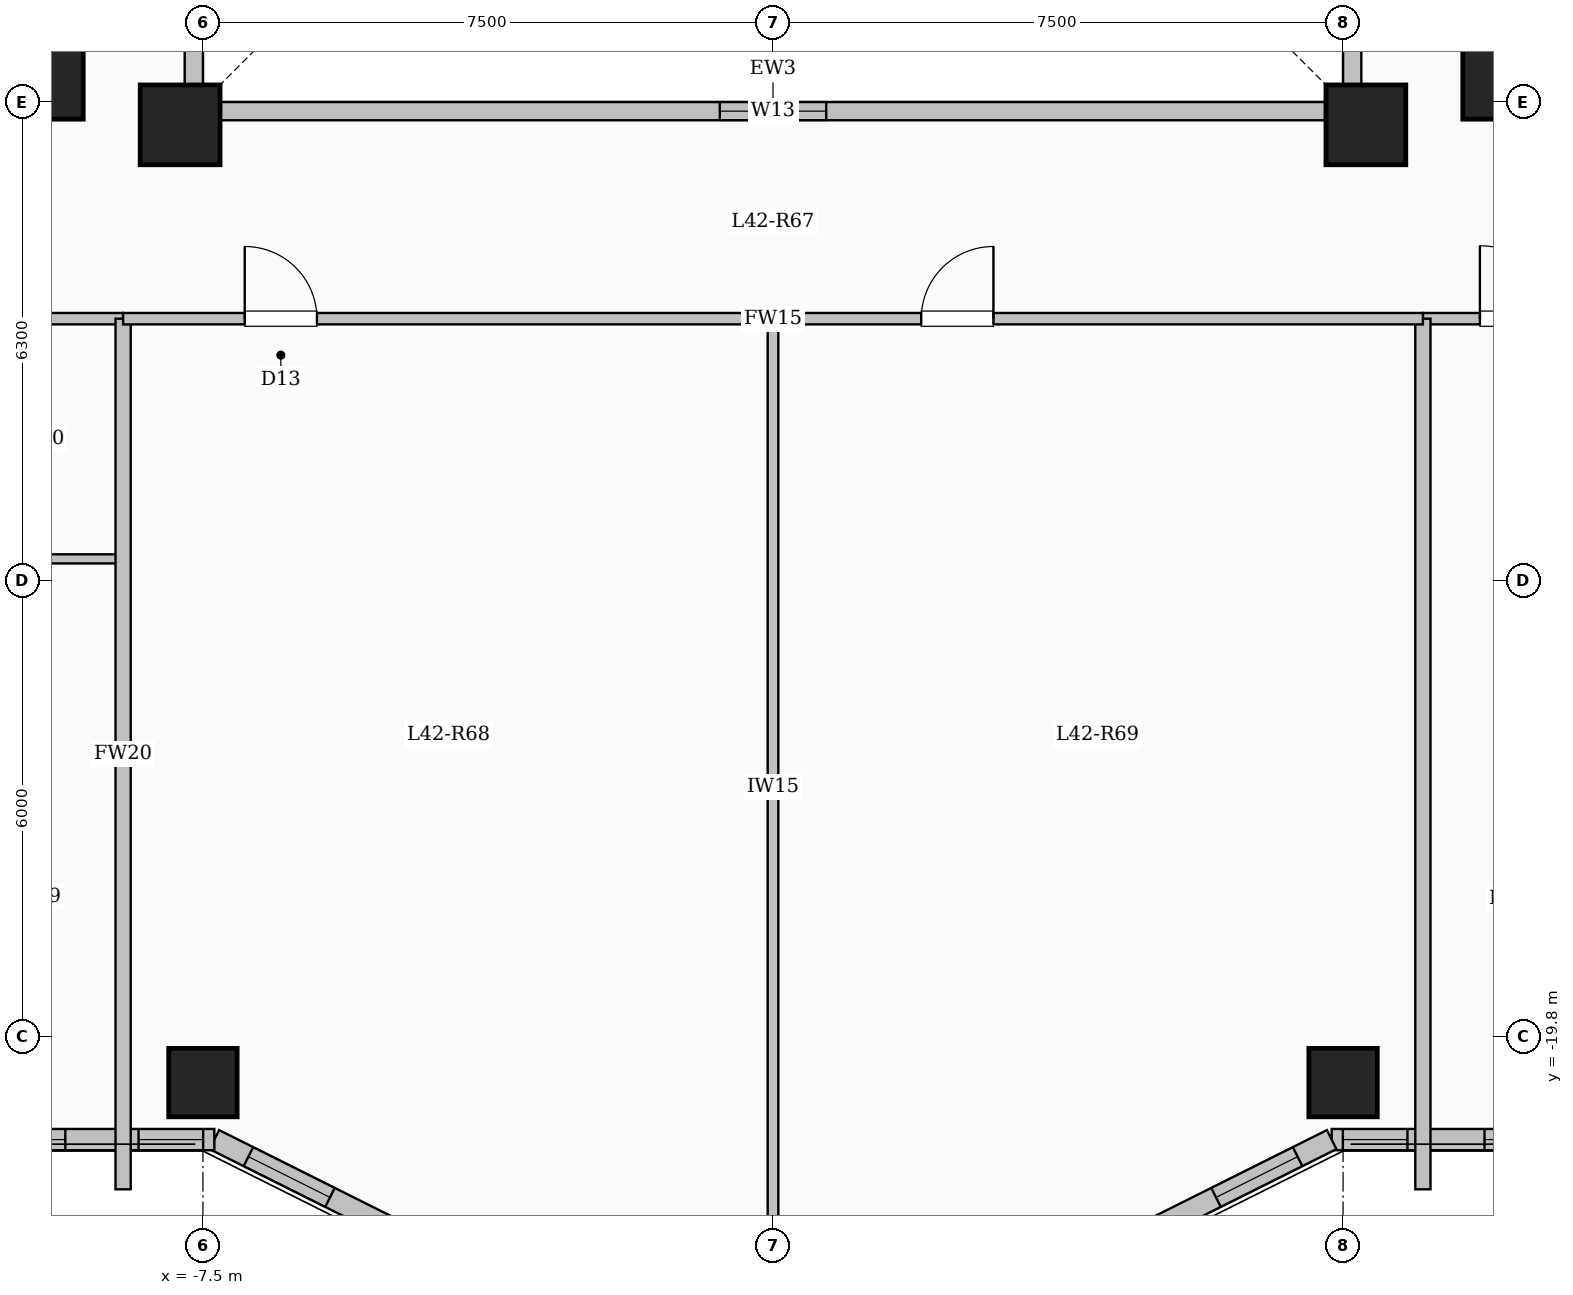
"""IFC4 building model, lengths in metres.
Left out: names, types, materials, properties, quantities, classifications, styles, units other than length and angle.
Written with IfcOpenShell. Run it as: python <this file> out.ifc"""

import sys

from ifc_helpers import new_model, si_unit, direction, frame, frame_2d, origin, origin_2d, place, context, subcontext, project, spatial, rectangle, extrude, element, fill, save


model = new_model("IFC4")
c1 = context("Model", 3, precision=1e-05, world=origin(), true_north=direction((0.0, 1.0)))
c2 = subcontext(c1, "Body", "Model", "MODEL_VIEW")
j1 = project(units=[si_unit("LENGTHUNIT", "METRE"), si_unit("PLANEANGLEUNIT", "RADIAN")], contexts=[c1])
p1 = place(None, origin())
s1 = spatial("IfcSite", under=j1, at=p1, CompositionType="ELEMENT")
p2 = place(p1, origin())
s2 = spatial("IfcBuilding", under=s1, at=p2, CompositionType="ELEMENT")
p3 = place(p2, frame((0.0, 0.0, 156.05)))
s3 = spatial("IfcBuildingStorey", under=s2, at=p3, CompositionType="ELEMENT", Elevation=156.05)
for number, where, z_axis, x_axis in (
    (1, (-7.8, -7.8, 0.0), (0.0, 0.0, 1.0), (1.0, 0.0, 0.0)),
    (2, (7.8, -7.8, 0.0), (0.0, 0.0, 1.0), (1.0, 0.0, 0.0)),
    (3, (-9.6, -7.2, 0.0), (0.0, 0.0, 1.0), (1.0, 0.0, 0.0)),
    (4, (9.6, -7.2, 0.0), (0.0, 0.0, 1.0), (1.0, 0.0, 0.0)),
):
    element("IfcColumn", number, at=place(p3, frame(where, z_axis=z_axis, x_axis=x_axis)), inside=s3, PredefinedType="COLUMN", context=c2, shape_type="SweptSolid", body=[
        extrude(rectangle(XDim=1.05, YDim=1.05, at=origin_2d()), origin(), (0.0, 0.0, 1.0), 3.35),
    ])
for number, where, z_axis, x_axis in (
    (5, (-7.5, -20.4, 0.0), (0.0, 0.0, 1.0), (1.0, 0.0, 0.0)),
    (6, (7.5, -20.4, 0.0), (0.0, 0.0, 1.0), (1.0, 0.0, 0.0)),
):
    element("IfcColumn", number, at=place(p3, frame(where, z_axis=z_axis, x_axis=x_axis)), inside=s3, PredefinedType="COLUMN", context=c2, shape_type="SweptSolid", body=[
        extrude(rectangle(XDim=0.9, YDim=0.9, at=origin_2d()), origin(), (0.0, 0.0, 1.0), 3.35),
    ])
p4 = place(p3, frame((-7.62, -7.62, 0.0), z_axis=(0.0, 0.0, 1.0), x_axis=(1.0, 0.0, 0.0)))
e7 = element("IfcWall", 7, at=p4, inside=s3, PredefinedType="SOLIDWALL", context=c2, shape_type="SweptSolid", body=[
    extrude(rectangle(XDim=15.24, YDim=0.24, at=frame_2d((7.62, 0.0))), origin(), (0.0, 0.0, 1.0), 3.1),
])
p5 = place(p4, frame((6.92, 0.0, 0.95)))
e8 = element("IfcOpeningElement", 8, at=p5, cuts=e7, PredefinedType="OPENING", context=c2, shape_type="SweptSolid", body=[
    extrude(rectangle(XDim=1.4, YDim=1.5, at=frame_2d((0.7, 0.75))), frame((0.0, 0.13, 0.0), z_axis=(0.0, -1.0, 0.0), x_axis=(1.0, 0.0, 0.0)), (0.0, 0.0, 1.0), 0.26),
])
p6 = place(p3, frame((7.62, -7.62, 0.0), z_axis=(0.0, 0.0, 1.0), x_axis=(0.0, 1.0, 0.0)))
e9 = element("IfcWall", 9, at=p6, inside=s3, PredefinedType="SOLIDWALL", context=c2, shape_type="SweptSolid", body=[
    extrude(rectangle(XDim=15.24, YDim=0.24, at=frame_2d((7.62, 0.0))), origin(), (0.0, 0.0, 1.0), 3.1),
])
p7 = place(p6, frame((6.92, 0.0, 0.95)))
e10 = element("IfcOpeningElement", 10, at=p7, cuts=e9, PredefinedType="OPENING", context=c2, shape_type="SweptSolid", body=[
    extrude(rectangle(XDim=1.4, YDim=1.5, at=frame_2d((0.7, 0.75))), frame((0.0, 0.13, 0.0), z_axis=(0.0, -1.0, 0.0), x_axis=(1.0, 0.0, 0.0)), (0.0, 0.0, 1.0), 0.26),
])
p8 = place(p3, frame((-7.62, 7.62, 0.0), z_axis=(0.0, 0.0, 1.0), x_axis=(0.0, -1.0, 0.0)))
e11 = element("IfcWall", 11, at=p8, inside=s3, PredefinedType="SOLIDWALL", context=c2, shape_type="SweptSolid", body=[
    extrude(rectangle(XDim=15.24, YDim=0.24, at=frame_2d((7.62, 0.0))), origin(), (0.0, 0.0, 1.0), 3.1),
])
p9 = place(p8, frame((6.92, 0.0, 0.95)))
e12 = element("IfcOpeningElement", 12, at=p9, cuts=e11, PredefinedType="OPENING", context=c2, shape_type="SweptSolid", body=[
    extrude(rectangle(XDim=1.4, YDim=1.5, at=frame_2d((0.7, 0.75))), frame((0.0, 0.13, 0.0), z_axis=(0.0, -1.0, 0.0), x_axis=(1.0, 0.0, 0.0)), (0.0, 0.0, 1.0), 0.26),
])
p10 = place(p3, frame((19.65, -21.15, 0.0), z_axis=(0.0, 0.0, 1.0), x_axis=(-1.0, 0.0, 0.0)))
e13 = element("IfcWall", 13, at=p10, inside=s3, PredefinedType="SOLIDWALL", context=c2, shape_type="SweptSolid", body=[
    extrude(rectangle(XDim=12.3, YDim=0.28, at=frame_2d((6.15, 0.0))), origin(), (0.0, 0.0, 1.0), 3.1),
])
p11 = place(p10, frame((0.856, 0.0, 0.95)))
e14 = element("IfcOpeningElement", 14, at=p11, cuts=e13, PredefinedType="OPENING", context=c2, shape_type="SweptSolid", body=[
    extrude(rectangle(XDim=1.2, YDim=1.5, at=frame_2d((0.6, 0.75))), frame((0.0, 0.15, 0.0), z_axis=(0.0, -1.0, 0.0), x_axis=(1.0, 0.0, 0.0)), (0.0, 0.0, 1.0), 0.3),
])
p12 = place(p10, frame((3.568, 0.0, 0.9)))
e15 = element("IfcOpeningElement", 15, at=p12, cuts=e13, PredefinedType="OPENING", context=c2, shape_type="SweptSolid", body=[
    extrude(rectangle(XDim=1.5, YDim=1.65, at=frame_2d((0.75, 0.825))), frame((0.0, 0.15, 0.0), z_axis=(0.0, -1.0, 0.0), x_axis=(1.0, 0.0, 0.0)), (0.0, 0.0, 1.0), 0.3),
])
p13 = place(p10, frame((6.454, 0.0, 0.95)))
e16 = element("IfcOpeningElement", 16, at=p13, cuts=e13, PredefinedType="OPENING", context=c2, shape_type="SweptSolid", body=[
    extrude(rectangle(XDim=1.2, YDim=1.5, at=frame_2d((0.6, 0.75))), frame((0.0, 0.15, 0.0), z_axis=(0.0, -1.0, 0.0), x_axis=(1.0, 0.0, 0.0)), (0.0, 0.0, 1.0), 0.3),
])
p14 = place(p10, frame((9.089, 0.0, 0.95)))
e17 = element("IfcOpeningElement", 17, at=p14, cuts=e13, PredefinedType="OPENING", context=c2, shape_type="SweptSolid", body=[
    extrude(rectangle(XDim=1.2, YDim=1.5, at=frame_2d((0.6, 0.75))), frame((0.0, 0.15, 0.0), z_axis=(0.0, -1.0, 0.0), x_axis=(1.0, 0.0, 0.0)), (0.0, 0.0, 1.0), 0.3),
])
p15 = place(p10, frame((11.303, 0.0, 0.95)))
e18 = element("IfcOpeningElement", 18, at=p15, cuts=e13, PredefinedType="OPENING", context=c2, shape_type="SweptSolid", body=[
    extrude(rectangle(XDim=0.85, YDim=1.5, at=frame_2d((0.425, 0.75))), frame((0.0, 0.15, 0.0), z_axis=(0.0, -1.0, 0.0), x_axis=(1.0, 0.0, 0.0)), (0.0, 0.0, 1.0), 0.3),
])
p16 = place(p3, frame((7.35, -21.15, 0.0), z_axis=(0.0, 0.0, 1.0), x_axis=(-0.894427191, -0.4472135955, 0.0)))
e19 = element("IfcWall", 19, at=p16, inside=s3, PredefinedType="SOLIDWALL", context=c2, shape_type="SweptSolid", body=[
    extrude(rectangle(XDim=3.354, YDim=0.28, at=frame_2d((1.677, 0.0))), origin(), (0.0, 0.0, 1.0), 3.1),
])
p17 = place(p16, frame((0.501, 0.0, 0.95)))
e20 = element("IfcOpeningElement", 20, at=p17, cuts=e19, PredefinedType="OPENING", context=c2, shape_type="SweptSolid", body=[
    extrude(rectangle(XDim=1.2, YDim=1.5, at=frame_2d((0.6, 0.75))), frame((0.0, 0.15, 0.0), z_axis=(0.0, -1.0, 0.0), x_axis=(1.0, 0.0, 0.0)), (0.0, 0.0, 1.0), 0.3),
])
p18 = place(p3, frame((-4.35, -22.65, 0.0), z_axis=(0.0, 0.0, 1.0), x_axis=(-0.894427191, 0.4472135955, 0.0)))
e21 = element("IfcWall", 21, at=p18, inside=s3, PredefinedType="SOLIDWALL", context=c2, shape_type="SweptSolid", body=[
    extrude(rectangle(XDim=3.354, YDim=0.28, at=frame_2d((1.677, 0.0))), origin(), (0.0, 0.0, 1.0), 3.1),
])
p19 = place(p18, frame((1.653, 0.0, 0.95)))
e22 = element("IfcOpeningElement", 22, at=p19, cuts=e21, PredefinedType="OPENING", context=c2, shape_type="SweptSolid", body=[
    extrude(rectangle(XDim=1.2, YDim=1.5, at=frame_2d((0.6, 0.75))), frame((0.0, 0.15, 0.0), z_axis=(0.0, -1.0, 0.0), x_axis=(1.0, 0.0, 0.0)), (0.0, 0.0, 1.0), 0.3),
])
p20 = place(p3, frame((-7.35, -21.15, 0.0), z_axis=(0.0, 0.0, 1.0), x_axis=(-1.0, 0.0, 0.0)))
e23 = element("IfcWall", 23, at=p20, inside=s3, PredefinedType="SOLIDWALL", context=c2, shape_type="SweptSolid", body=[
    extrude(rectangle(XDim=12.3, YDim=0.28, at=frame_2d((6.15, 0.0))), origin(), (0.0, 0.0, 1.0), 3.1),
])
p21 = place(p20, frame((0.147, 0.0, 0.95)))
e24 = element("IfcOpeningElement", 24, at=p21, cuts=e23, PredefinedType="OPENING", context=c2, shape_type="SweptSolid", body=[
    extrude(rectangle(XDim=0.85, YDim=1.5, at=frame_2d((0.425, 0.75))), frame((0.0, 0.15, 0.0), z_axis=(0.0, -1.0, 0.0), x_axis=(1.0, 0.0, 0.0)), (0.0, 0.0, 1.0), 0.3),
])
p22 = place(p20, frame((1.96, 0.0, 0.95)))
e25 = element("IfcOpeningElement", 25, at=p22, cuts=e23, PredefinedType="OPENING", context=c2, shape_type="SweptSolid", body=[
    extrude(rectangle(XDim=1.2, YDim=1.5, at=frame_2d((0.6, 0.75))), frame((0.0, 0.15, 0.0), z_axis=(0.0, -1.0, 0.0), x_axis=(1.0, 0.0, 0.0)), (0.0, 0.0, 1.0), 0.3),
])
p23 = place(p20, frame((4.697, 0.0, 0.95)))
e26 = element("IfcOpeningElement", 26, at=p23, cuts=e23, PredefinedType="OPENING", context=c2, shape_type="SweptSolid", body=[
    extrude(rectangle(XDim=1.2, YDim=1.5, at=frame_2d((0.6, 0.75))), frame((0.0, 0.15, 0.0), z_axis=(0.0, -1.0, 0.0), x_axis=(1.0, 0.0, 0.0)), (0.0, 0.0, 1.0), 0.3),
])
p24 = place(p20, frame((7.433, 0.0, 0.95)))
e27 = element("IfcOpeningElement", 27, at=p24, cuts=e23, PredefinedType="OPENING", context=c2, shape_type="SweptSolid", body=[
    extrude(rectangle(XDim=1.2, YDim=1.5, at=frame_2d((0.6, 0.75))), frame((0.0, 0.15, 0.0), z_axis=(0.0, -1.0, 0.0), x_axis=(1.0, 0.0, 0.0)), (0.0, 0.0, 1.0), 0.3),
])
p25 = place(p20, frame((10.194, 0.0, 0.95)))
e28 = element("IfcOpeningElement", 28, at=p25, cuts=e23, PredefinedType="OPENING", context=c2, shape_type="SweptSolid", body=[
    extrude(rectangle(XDim=1.2, YDim=1.5, at=frame_2d((0.6, 0.75))), frame((0.0, 0.15, 0.0), z_axis=(0.0, -1.0, 0.0), x_axis=(1.0, 0.0, 0.0)), (0.0, 0.0, 1.0), 0.3),
])
p26 = place(p3, frame((-19.55, -10.35, 0.0), z_axis=(0.0, 0.0, 1.0), x_axis=(1.0, 0.0, 0.0)))
e29 = element("IfcWall", 29, at=p26, inside=s3, PredefinedType="PARTITIONING", context=c2, shape_type="SweptSolid", body=[
    extrude(rectangle(XDim=11.0, YDim=0.15, at=frame_2d((5.5, 0.0))), origin(), (0.0, 0.0, 1.0), 3.1),
])
p27 = place(p26, frame((0.7, 0.0, 0.0)))
e30 = element("IfcOpeningElement", 30, at=p27, cuts=e29, PredefinedType="OPENING", context=c2, shape_type="SweptSolid", body=[
    extrude(rectangle(XDim=0.96, YDim=2.15, at=frame_2d((0.48, 1.075))), frame((0.0, 0.085, 0.0), z_axis=(0.0, -1.0, 0.0), x_axis=(1.0, 0.0, 0.0)), (0.0, 0.0, 1.0), 0.17),
])
p28 = place(p26, frame((6.175, 0.0, 0.0)))
e31 = element("IfcOpeningElement", 31, at=p28, cuts=e29, PredefinedType="OPENING", context=c2, shape_type="SweptSolid", body=[
    extrude(rectangle(XDim=0.96, YDim=2.15, at=frame_2d((0.48, 1.075))), frame((0.0, 0.085, 0.0), z_axis=(0.0, -1.0, 0.0), x_axis=(1.0, 0.0, 0.0)), (0.0, 0.0, 1.0), 0.17),
])
p29 = place(p3, frame((8.55, -10.35, 0.0), z_axis=(0.0, 0.0, 1.0), x_axis=(1.0, 0.0, 0.0)))
e32 = element("IfcWall", 32, at=p29, inside=s3, PredefinedType="PARTITIONING", context=c2, shape_type="SweptSolid", body=[
    extrude(rectangle(XDim=11.0, YDim=0.15, at=frame_2d((5.5, 0.0))), origin(), (0.0, 0.0, 1.0), 3.1),
])
p30 = place(p29, frame((0.75, 0.0, 0.0)))
e33 = element("IfcOpeningElement", 33, at=p30, cuts=e32, PredefinedType="OPENING", context=c2, shape_type="SweptSolid", body=[
    extrude(rectangle(XDim=0.96, YDim=2.15, at=frame_2d((0.48, 1.075))), frame((0.0, 0.085, 0.0), z_axis=(0.0, -1.0, 0.0), x_axis=(1.0, 0.0, 0.0)), (0.0, 0.0, 1.0), 0.17),
])
p31 = place(p29, frame((6.006, 0.0, 0.0)))
e34 = element("IfcOpeningElement", 34, at=p31, cuts=e32, PredefinedType="OPENING", context=c2, shape_type="SweptSolid", body=[
    extrude(rectangle(XDim=0.96, YDim=2.15, at=frame_2d((0.48, 1.075))), frame((0.0, 0.085, 0.0), z_axis=(0.0, -1.0, 0.0), x_axis=(1.0, 0.0, 0.0)), (0.0, 0.0, 1.0), 0.17),
])
p32 = place(p3, frame((-11.29, -13.51, 0.0), z_axis=(0.0, 0.0, 1.0), x_axis=(1.0, 0.0, 0.0)))
e35 = element("IfcWall", 35, at=p32, inside=s3, PredefinedType="PARTITIONING", context=c2, shape_type="SweptSolid", body=[
    extrude(rectangle(XDim=2.75, YDim=0.12, at=frame_2d((1.375, 0.0))), origin(), (0.0, 0.0, 1.0), 3.1),
])
for number, where, z_axis, x_axis in (
    (36, (-8.55, -21.804, 0.0), (0.0, 0.0, 1.0), (0.0, 1.0, 0.0)),
    (37, (8.55, -21.804, 0.0), (0.0, 0.0, 1.0), (0.0, 1.0, 0.0)),
):
    element("IfcWall", number, at=place(p3, frame(where, z_axis=z_axis, x_axis=x_axis)), inside=s3, PredefinedType="SOLIDWALL", context=c2, shape_type="SweptSolid", body=[
        extrude(rectangle(XDim=11.454, YDim=0.2, at=frame_2d((5.727, 0.0))), origin(), (0.0, 0.0, 1.0), 3.1),
    ])
p33 = place(p3, frame((-8.55, -10.35, 0.0), z_axis=(0.0, 0.0, 1.0), x_axis=(1.0, 0.0, 0.0)))
e38 = element("IfcWall", 38, at=p33, inside=s3, PredefinedType="PARTITIONING", context=c2, shape_type="SweptSolid", body=[
    extrude(rectangle(XDim=17.1, YDim=0.15, at=frame_2d((8.55, 0.0))), origin(), (0.0, 0.0, 1.0), 3.1),
])
p34 = place(p33, frame((1.6, 0.0, 0.0)))
e39 = element("IfcOpeningElement", 39, at=p34, cuts=e38, PredefinedType="OPENING", context=c2, shape_type="SweptSolid", body=[
    extrude(rectangle(XDim=0.95, YDim=2.15, at=frame_2d((0.475, 1.075))), frame((0.0, 0.085, 0.0), z_axis=(0.0, -1.0, 0.0), x_axis=(1.0, 0.0, 0.0)), (0.0, 0.0, 1.0), 0.17),
])
p35 = place(p33, frame((10.5, 0.0, 0.0)))
e40 = element("IfcOpeningElement", 40, at=p35, cuts=e38, PredefinedType="OPENING", context=c2, shape_type="SweptSolid", body=[
    extrude(rectangle(XDim=0.95, YDim=2.15, at=frame_2d((0.475, 1.075))), frame((0.0, 0.085, 0.0), z_axis=(0.0, -1.0, 0.0), x_axis=(1.0, 0.0, 0.0)), (0.0, 0.0, 1.0), 0.17),
])
p36 = place(p3, frame((0.0, -22.68, 0.0), z_axis=(0.0, 0.0, 1.0), x_axis=(0.0, 1.0, 0.0)))
e41 = element("IfcWall", 41, at=p36, inside=s3, PredefinedType="PARTITIONING", context=c2, shape_type="SweptSolid", body=[
    extrude(rectangle(XDim=12.33, YDim=0.14, at=frame_2d((6.165, 0.0))), origin(), (0.0, 0.0, 1.0), 3.1),
])
p37 = place(p5, origin())
e42 = element("IfcWindow", 42, at=p37, inside=s3, PartitioningType="SINGLE_PANEL", PredefinedType="WINDOW", context=c2, shape_type="SweptSolid", body=[
    extrude(rectangle(XDim=1.4, YDim=1.5, at=frame_2d((0.7, 0.75))), frame((0.0, 0.03, 0.0), z_axis=(0.0, -1.0, 0.0), x_axis=(1.0, 0.0, 0.0)), (0.0, 0.0, 1.0), 0.06),
])
fill(e8, e42)
p38 = place(p14, origin())
e43 = element("IfcWindow", 43, at=p38, inside=s3, PartitioningType="SINGLE_PANEL", PredefinedType="WINDOW", context=c2, shape_type="SweptSolid", body=[
    extrude(rectangle(XDim=1.2, YDim=1.5, at=frame_2d((0.6, 0.75))), frame((0.0, 0.03, 0.0), z_axis=(0.0, -1.0, 0.0), x_axis=(1.0, 0.0, 0.0)), (0.0, 0.0, 1.0), 0.06),
])
fill(e17, e43)
p39 = place(p15, origin())
e44 = element("IfcWindow", 44, at=p39, inside=s3, PartitioningType="SINGLE_PANEL", PredefinedType="WINDOW", context=c2, shape_type="SweptSolid", body=[
    extrude(rectangle(XDim=0.85, YDim=1.5, at=frame_2d((0.425, 0.75))), frame((0.0, 0.03, 0.0), z_axis=(0.0, -1.0, 0.0), x_axis=(1.0, 0.0, 0.0)), (0.0, 0.0, 1.0), 0.06),
])
fill(e18, e44)
p40 = place(p17, origin())
e45 = element("IfcWindow", 45, at=p40, inside=s3, PartitioningType="SINGLE_PANEL", PredefinedType="WINDOW", context=c2, shape_type="SweptSolid", body=[
    extrude(rectangle(XDim=1.2, YDim=1.5, at=frame_2d((0.6, 0.75))), frame((0.0, 0.03, 0.0), z_axis=(0.0, -1.0, 0.0), x_axis=(1.0, 0.0, 0.0)), (0.0, 0.0, 1.0), 0.06),
])
fill(e20, e45)
p41 = place(p19, origin())
e46 = element("IfcWindow", 46, at=p41, inside=s3, PartitioningType="SINGLE_PANEL", PredefinedType="WINDOW", context=c2, shape_type="SweptSolid", body=[
    extrude(rectangle(XDim=1.2, YDim=1.5, at=frame_2d((0.6, 0.75))), frame((0.0, 0.03, 0.0), z_axis=(0.0, -1.0, 0.0), x_axis=(1.0, 0.0, 0.0)), (0.0, 0.0, 1.0), 0.06),
])
fill(e22, e46)
p42 = place(p21, origin())
e47 = element("IfcWindow", 47, at=p42, inside=s3, PartitioningType="SINGLE_PANEL", PredefinedType="WINDOW", context=c2, shape_type="SweptSolid", body=[
    extrude(rectangle(XDim=0.85, YDim=1.5, at=frame_2d((0.425, 0.75))), frame((0.0, 0.03, 0.0), z_axis=(0.0, -1.0, 0.0), x_axis=(1.0, 0.0, 0.0)), (0.0, 0.0, 1.0), 0.06),
])
fill(e24, e47)
p43 = place(p22, origin())
e48 = element("IfcWindow", 48, at=p43, inside=s3, PartitioningType="SINGLE_PANEL", PredefinedType="WINDOW", context=c2, shape_type="SweptSolid", body=[
    extrude(rectangle(XDim=1.2, YDim=1.5, at=frame_2d((0.6, 0.75))), frame((0.0, 0.03, 0.0), z_axis=(0.0, -1.0, 0.0), x_axis=(1.0, 0.0, 0.0)), (0.0, 0.0, 1.0), 0.06),
])
fill(e25, e48)
p44 = place(p30, origin())
e49 = element("IfcDoor", 49, at=p44, inside=s3, OperationType="SINGLE_SWING_LEFT", PredefinedType="DOOR", context=c2, shape_type="SweptSolid", body=[
    extrude(rectangle(XDim=0.96, YDim=2.15, at=frame_2d((0.48, 1.075))), frame((0.0, 0.025, 0.0), z_axis=(0.0, -1.0, 0.0), x_axis=(1.0, 0.0, 0.0)), (0.0, 0.0, 1.0), 0.05),
])
fill(e33, e49)
p45 = place(p34, origin())
e50 = element("IfcDoor", 50, at=p45, inside=s3, OperationType="SINGLE_SWING_LEFT", PredefinedType="DOOR", context=c2, shape_type="SweptSolid", body=[
    extrude(rectangle(XDim=0.95, YDim=2.15, at=frame_2d((0.475, 1.075))), frame((0.0, 0.025, 0.0), z_axis=(0.0, -1.0, 0.0), x_axis=(1.0, 0.0, 0.0)), (0.0, 0.0, 1.0), 0.05),
])
fill(e39, e50)
p46 = place(p35, origin())
e51 = element("IfcDoor", 51, at=p46, inside=s3, OperationType="SINGLE_SWING_RIGHT", PredefinedType="DOOR", context=c2, shape_type="SweptSolid", body=[
    extrude(rectangle(XDim=0.95, YDim=2.15, at=frame_2d((0.475, 1.075))), frame((0.0, 0.025, 0.0), z_axis=(0.0, -1.0, 0.0), x_axis=(1.0, 0.0, 0.0)), (0.0, 0.0, 1.0), 0.05),
])
fill(e40, e51)
save(model, sys.argv[1])
